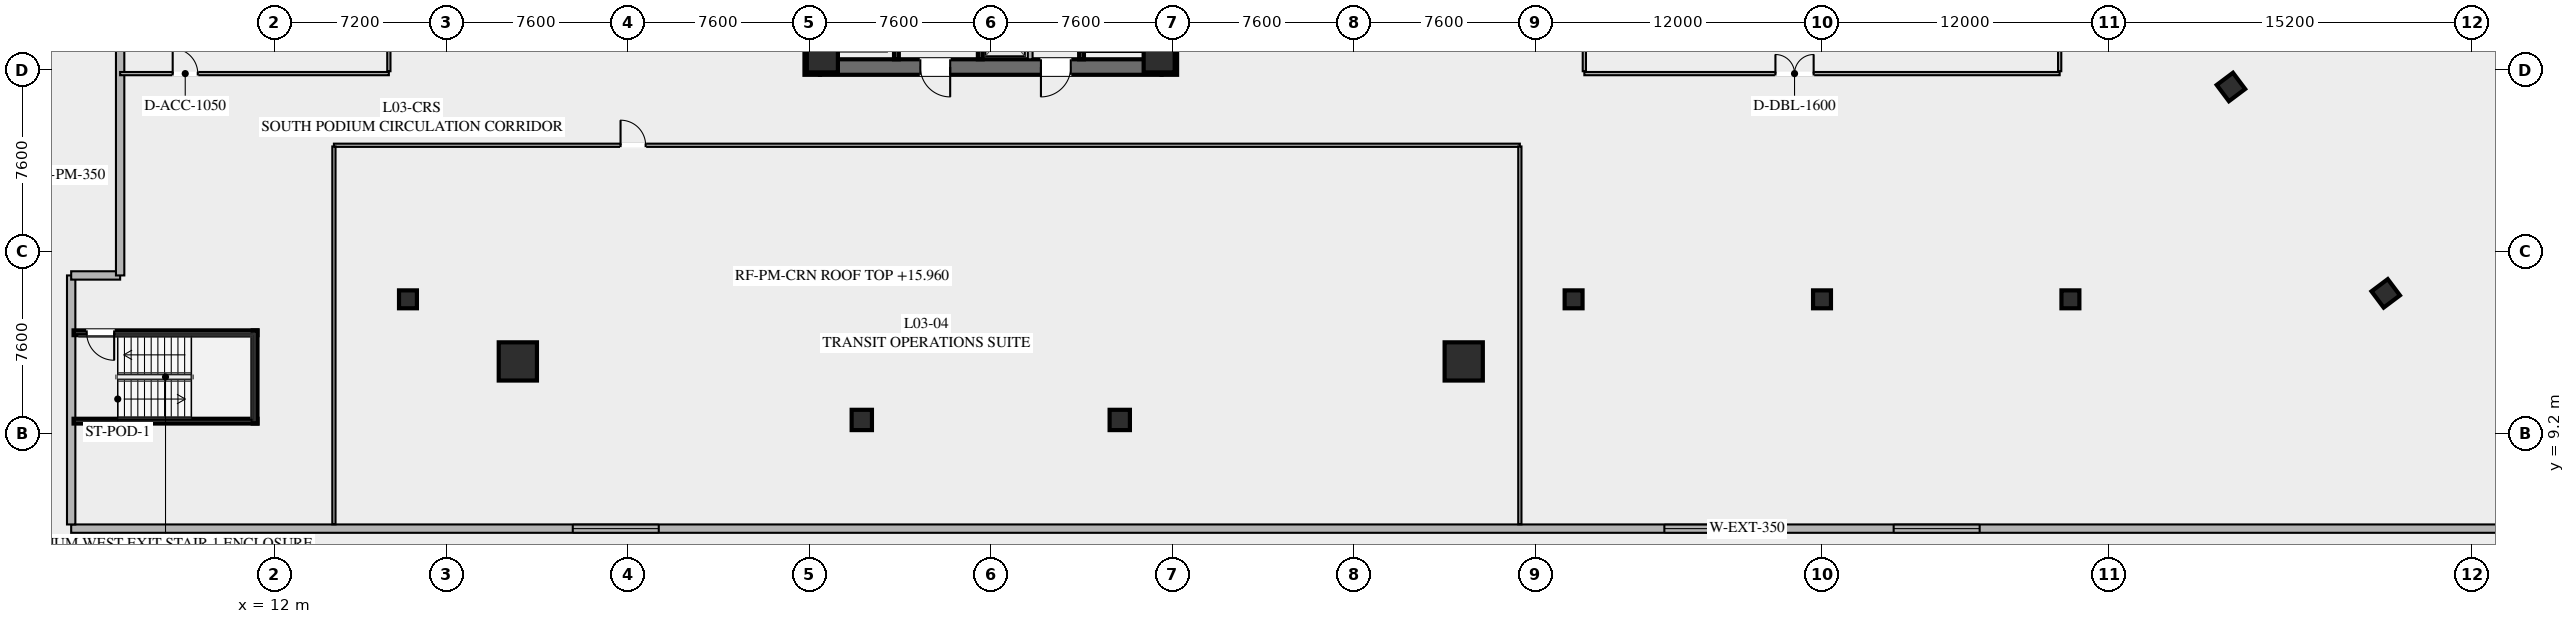
"""IFC4 building model, lengths in metres.
Left out: names, types, materials, properties, quantities, classifications, styles, units other than length and angle.
Written with IfcOpenShell. Run it as: python <this file> out.ifc"""

import sys

from ifc_helpers import new_model, si_unit, direction, frame, frame_2d, origin, origin_2d, place, context, subcontext, project, spatial, rectangle, hollow_rectangle, extrude, element, fill, save


model = new_model("IFC4")
c1 = context("Model", 3, precision=1e-05, world=origin(), true_north=direction((0.0, 1.0)))
c2 = subcontext(c1, "Body", "Model", "MODEL_VIEW")
j1 = project(units=[si_unit("LENGTHUNIT", "METRE"), si_unit("PLANEANGLEUNIT", "RADIAN")], contexts=[c1])
p1 = place(None, origin())
s1 = spatial("IfcSite", under=j1, at=p1, CompositionType="ELEMENT")
p2 = place(p1, origin())
s2 = spatial("IfcBuilding", under=s1, at=p2, CompositionType="ELEMENT")
p3 = place(p2, frame((0.0, 0.0, 15.6)))
s3 = spatial("IfcBuildingStorey", under=s2, at=p3, CompositionType="ELEMENT", Elevation=15.6)
for number, where, z_axis, x_axis in (
    (1, (34.525, 24.2, 0.0), (0.0, 0.0, 1.0), (0.0, 1.0, 0.0)),
    (2, (49.475, 39.8, 0.0), (0.0, 0.0, 1.0), (0.0, -1.0, 0.0)),
):
    element("IfcWall", number, at=place(p3, frame(where, z_axis=z_axis, x_axis=x_axis)), inside=s3, PredefinedType="SHEAR", context=c2, shape_type="SweptSolid", body=[
        extrude(rectangle(XDim=15.6, YDim=0.65, at=frame_2d((7.8, 0.0))), origin(), (0.0, 0.0, 1.0), 4.2),
    ])
p4 = place(p3, frame((49.15, 24.525, 0.0), z_axis=(0.0, 0.0, 1.0), x_axis=(-1.0, 0.0, 0.0)))
e3 = element("IfcWall", 3, at=p4, inside=s3, PredefinedType="SHEAR", context=c2, shape_type="SweptSolid", body=[
    extrude(rectangle(XDim=14.3, YDim=0.65, at=frame_2d((7.15, 0.0))), origin(), (0.0, 0.0, 1.0), 4.2),
])
p5 = place(p4, frame((8.85, 0.0, 0.0)))
e4 = element("IfcOpeningElement", 4, at=p5, cuts=e3, PredefinedType="OPENING", context=c2, shape_type="SweptSolid", body=[
    extrude(rectangle(XDim=1.25, YDim=2.25, at=frame_2d((0.625, 1.125))), frame((0.0, 0.335, 0.0), z_axis=(0.0, -1.0, 0.0), x_axis=(1.0, 0.0, 0.0)), (0.0, 0.0, 1.0), 0.67),
])
p6 = place(p4, frame((3.8, 0.0, 0.0)))
e5 = element("IfcOpeningElement", 5, at=p6, cuts=e3, PredefinedType="OPENING", context=c2, shape_type="SweptSolid", body=[
    extrude(rectangle(XDim=1.25, YDim=2.25, at=frame_2d((0.625, 1.125))), frame((0.0, 0.335, 0.0), z_axis=(0.0, -1.0, 0.0), x_axis=(1.0, 0.0, 0.0)), (0.0, 0.0, 1.0), 0.67),
])
for number, where, z_axis, x_axis in (
    (6, (34.95, 24.95, 0.0), (0.0, 0.0, 1.0), (1.0, 0.0, 0.0)),
    (7, (49.05, 24.95, 0.0), (0.0, 0.0, 1.0), (1.0, 0.0, 0.0)),
):
    element("IfcColumn", number, at=place(p3, frame(where, z_axis=z_axis, x_axis=x_axis)), inside=s3, PredefinedType="COLUMN", context=c2, shape_type="SweptSolid", body=[
        extrude(hollow_rectangle(XDim=1.3, YDim=1.3, WallThickness=0.05, at=origin_2d()), origin(), (0.0, 0.0, 1.0), 3.9),
    ])
for number, where, z_axis, x_axis in (
    (8, (22.2, 12.2, 0.0), (0.0, 0.0, 1.0), (1.0, 0.0, 0.0)),
    (9, (61.8, 12.2, 0.0), (0.0, 0.0, 1.0), (1.0, 0.0, 0.0)),
):
    element("IfcColumn", number, at=place(p3, frame(where, z_axis=z_axis, x_axis=x_axis)), inside=s3, PredefinedType="COLUMN", context=c2, shape_type="SweptSolid", body=[
        extrude(hollow_rectangle(XDim=1.6, YDim=1.6, WallThickness=0.06, at=origin_2d()), origin(), (0.0, 0.0, 1.0), 3.9),
    ])
for number, where, z_axis, x_axis in (
    (10, (36.6, 9.75, 0.0), (0.0, 0.0, 1.0), (1.0, 0.0, 0.0)),
    (11, (47.4, 9.75, 0.0), (0.0, 0.0, 1.0), (1.0, 0.0, 0.0)),
):
    element("IfcColumn", number, at=place(p3, frame(where, z_axis=z_axis, x_axis=x_axis)), inside=s3, PredefinedType="COLUMN", context=c2, shape_type="SweptSolid", body=[
        extrude(hollow_rectangle(XDim=0.85, YDim=0.85, WallThickness=0.035, at=origin_2d()), origin(), (0.0, 0.0, 1.0), 3.9),
    ])
p7 = place(p3, frame((112.476, 21.107, 0.0), z_axis=(0.0, 0.0, 1.0), x_axis=(-0.600005007985, 0.799996243986, 0.0)))
e12 = element("IfcWall", 12, at=p7, inside=s3, PredefinedType="SHEAR", context=c2, shape_type="SweptSolid", body=[
    extrude(rectangle(XDim=15.6, YDim=0.65, at=frame_2d((7.8, 0.0))), origin(), (0.0, 0.0, 1.0), 4.2),
])
for number, where, z_axis, x_axis in (
    (13, (93.92, 23.69, 0.0), (0.0, 0.0, 1.0), (0.8, 0.6, 0.0)),
    (14, (100.4, 15.05, 0.0), (0.0, 0.0, 1.0), (0.8, 0.6, 0.0)),
):
    element("IfcColumn", number, at=place(p3, frame(where, z_axis=z_axis, x_axis=x_axis)), inside=s3, PredefinedType="COLUMN", context=c2, shape_type="SweptSolid", body=[
        extrude(hollow_rectangle(XDim=0.85, YDim=0.85, WallThickness=0.035, at=origin_2d()), origin(), (0.0, 0.0, 1.0), 3.9),
    ])
for number, where, z_axis, x_axis in (
    (15, (17.6, 14.8, 0.0), (0.0, 0.0, 1.0), (1.0, 0.0, 0.0)),
    (16, (66.4, 14.8, 0.0), (0.0, 0.0, 1.0), (1.0, 0.0, 0.0)),
    (17, (76.8, 14.8, 0.0), (0.0, 0.0, 1.0), (1.0, 0.0, 0.0)),
    (18, (87.2, 14.8, 0.0), (0.0, 0.0, 1.0), (1.0, 0.0, 0.0)),
):
    element("IfcColumn", number, at=place(p3, frame(where, z_axis=z_axis, x_axis=x_axis)), inside=s3, PredefinedType="COLUMN", context=c2, shape_type="SweptSolid", body=[
        extrude(rectangle(XDim=0.75, YDim=0.75, at=origin_2d()), origin(), (0.0, 0.0, 1.0), 3.9),
    ])
p8 = place(p3, frame((143.825, 5.2, 0.0), z_axis=(0.0, 0.0, 1.0), x_axis=(-1.0, 0.0, 0.0)))
e19 = element("IfcWall", 19, at=p8, inside=s3, PredefinedType="SOLIDWALL", context=c2, shape_type="SweptSolid", body=[
    extrude(rectangle(XDim=140.325, YDim=0.35, at=frame_2d((70.163, 0.0))), origin(), (0.0, 0.0, 1.0), 3.9),
])
p9 = place(p8, frame((115.725, 0.0, 0.95)))
e20 = element("IfcOpeningElement", 20, at=p9, cuts=e19, PredefinedType="OPENING", context=c2, shape_type="SweptSolid", body=[
    extrude(rectangle(XDim=3.6, YDim=1.8, at=frame_2d((1.8, 0.9))), frame((0.0, 0.185, 0.0), z_axis=(0.0, -1.0, 0.0), x_axis=(1.0, 0.0, 0.0)), (0.0, 0.0, 1.0), 0.37),
])
p10 = place(p8, frame((70.025, 0.0, 0.95)))
e21 = element("IfcOpeningElement", 21, at=p10, cuts=e19, PredefinedType="OPENING", context=c2, shape_type="SweptSolid", body=[
    extrude(rectangle(XDim=3.6, YDim=1.8, at=frame_2d((1.8, 0.9))), frame((0.0, 0.185, 0.0), z_axis=(0.0, -1.0, 0.0), x_axis=(1.0, 0.0, 0.0)), (0.0, 0.0, 1.0), 0.37),
])
p11 = place(p8, frame((60.425, 0.0, 0.95)))
e22 = element("IfcOpeningElement", 22, at=p11, cuts=e19, PredefinedType="OPENING", context=c2, shape_type="SweptSolid", body=[
    extrude(rectangle(XDim=3.6, YDim=1.8, at=frame_2d((1.8, 0.9))), frame((0.0, 0.185, 0.0), z_axis=(0.0, -1.0, 0.0), x_axis=(1.0, 0.0, 0.0)), (0.0, 0.0, 1.0), 0.37),
])
p12 = place(p3, frame((3.5, 5.375, 0.0), z_axis=(0.0, 0.0, 1.0), x_axis=(0.0, 1.0, 0.0)))
e23 = element("IfcWall", 23, at=p12, inside=s3, PredefinedType="SOLIDWALL", context=c2, shape_type="SweptSolid", body=[
    extrude(rectangle(XDim=10.425, YDim=0.35, at=frame_2d((5.212, 0.0))), origin(), (0.0, 0.0, 1.0), 3.9),
])
p13 = place(p3, frame((3.5, 15.8, 0.0), z_axis=(0.0, 0.0, 1.0), x_axis=(1.0, 0.0, 0.0)))
e24 = element("IfcWall", 24, at=p13, inside=s3, PredefinedType="SOLIDWALL", context=c2, shape_type="SweptSolid", body=[
    extrude(rectangle(XDim=2.05, YDim=0.35, at=frame_2d((1.025, 0.0))), origin(), (0.0, 0.0, 1.0), 3.9),
])
p14 = place(p3, frame((5.55, 15.8, 0.0), z_axis=(0.0, 0.0, 1.0), x_axis=(0.0, 1.0, 0.0)))
e25 = element("IfcWall", 25, at=p14, inside=s3, PredefinedType="SOLIDWALL", context=c2, shape_type="SweptSolid", body=[
    extrude(rectangle(XDim=42.475, YDim=0.35, at=frame_2d((21.237, 0.0))), origin(), (0.0, 0.0, 1.0), 3.9),
])
p15 = place(p14, frame((15.7, 0.0, 0.0)))
e26 = element("IfcOpeningElement", 26, at=p15, cuts=e25, PredefinedType="OPENING", context=c2, shape_type="SweptSolid", body=[
    extrude(rectangle(XDim=1.65, YDim=2.2, at=frame_2d((0.825, 1.1))), frame((0.0, 0.185, 0.0), z_axis=(0.0, -1.0, 0.0), x_axis=(1.0, 0.0, 0.0)), (0.0, 0.0, 1.0), 0.37),
])
p16 = place(p3, frame((45.8, 32.8, 0.0), z_axis=(0.0, 0.0, 1.0), x_axis=(0.0, -1.0, 0.0)))
e27 = element("IfcWall", 27, at=p16, inside=s3, PredefinedType="SHEAR", context=c2, shape_type="SweptSolid", body=[
    extrude(rectangle(XDim=7.95, YDim=0.2, at=frame_2d((3.975, 0.0))), origin(), (0.0, 0.0, 1.0), 3.9),
])
p17 = place(p16, frame((0.45, 0.0, 0.0)))
e28 = element("IfcOpeningElement", 28, at=p17, cuts=e27, PredefinedType="OPENING", context=c2, shape_type="SweptSolid", body=[
    extrude(rectangle(XDim=1.15, YDim=2.2, at=frame_2d((0.575, 1.1))), frame((0.0, 0.11, 0.0), z_axis=(0.0, -1.0, 0.0), x_axis=(1.0, 0.0, 0.0)), (0.0, 0.0, 1.0), 0.22),
])
p18 = place(p3, frame((41.56, 24.85, 0.0), z_axis=(0.0, 0.0, 1.0), x_axis=(0.0, 1.0, 0.0)))
e29 = element("IfcWall", 29, at=p18, inside=s3, PredefinedType="SHEAR", context=c2, shape_type="SweptSolid", body=[
    extrude(rectangle(XDim=14.3, YDim=0.2, at=frame_2d((7.15, 0.0))), origin(), (0.0, 0.0, 1.0), 3.9),
])
p19 = place(p3, frame((38.05, 24.85, 0.0), z_axis=(0.0, 0.0, 1.0), x_axis=(0.0, 1.0, 0.0)))
e30 = element("IfcWall", 30, at=p19, inside=s3, PredefinedType="SHEAR", context=c2, shape_type="SweptSolid", body=[
    extrude(rectangle(XDim=6.35, YDim=0.2, at=frame_2d((3.175, 0.0))), origin(), (0.0, 0.0, 1.0), 3.9),
])
p20 = place(p19, frame((4.775, 0.0, 0.0)))
e31 = element("IfcOpeningElement", 31, at=p20, cuts=e30, PredefinedType="OPENING", context=c2, shape_type="SweptSolid", body=[
    extrude(rectangle(XDim=1.3, YDim=2.25, at=frame_2d((0.65, 1.125))), frame((0.0, 0.11, 0.0), z_axis=(0.0, -1.0, 0.0), x_axis=(1.0, 0.0, 0.0)), (0.0, 0.0, 1.0), 0.22),
])
p21 = place(p19, frame((2.775, 0.0, 0.0)))
e32 = element("IfcOpeningElement", 32, at=p21, cuts=e30, PredefinedType="OPENING", context=c2, shape_type="SweptSolid", body=[
    extrude(rectangle(XDim=1.3, YDim=2.25, at=frame_2d((0.65, 1.125))), frame((0.0, 0.11, 0.0), z_axis=(0.0, -1.0, 0.0), x_axis=(1.0, 0.0, 0.0)), (0.0, 0.0, 1.0), 0.22),
])
p22 = place(p19, frame((0.575, 0.0, 0.0)))
e33 = element("IfcOpeningElement", 33, at=p22, cuts=e30, PredefinedType="OPENING", context=c2, shape_type="SweptSolid", body=[
    extrude(rectangle(XDim=1.3, YDim=2.25, at=frame_2d((0.65, 1.125))), frame((0.0, 0.11, 0.0), z_axis=(0.0, -1.0, 0.0), x_axis=(1.0, 0.0, 0.0)), (0.0, 0.0, 1.0), 0.22),
])
p23 = place(p3, frame((43.65, 24.85, 0.0), z_axis=(0.0, 0.0, 1.0), x_axis=(0.0, 1.0, 0.0)))
e34 = element("IfcWall", 34, at=p23, inside=s3, PredefinedType="SOLIDWALL", context=c2, shape_type="SweptSolid", body=[
    extrude(rectangle(XDim=6.8, YDim=0.2, at=frame_2d((3.4, 0.0))), origin(), (0.0, 0.0, 1.0), 3.9),
])
p24 = place(p23, frame((0.625, 0.0, 0.0)))
e35 = element("IfcOpeningElement", 35, at=p24, cuts=e34, PredefinedType="OPENING", context=c2, shape_type="SweptSolid", body=[
    extrude(rectangle(XDim=1.1, YDim=2.2, at=frame_2d((0.55, 1.1))), frame((0.0, 0.11, 0.0), z_axis=(0.0, -1.0, 0.0), x_axis=(1.0, 0.0, 0.0)), (0.0, 0.0, 1.0), 0.22),
])
p25 = place(p23, frame((2.875, 0.0, 0.0)))
e36 = element("IfcOpeningElement", 36, at=p25, cuts=e34, PredefinedType="OPENING", context=c2, shape_type="SweptSolid", body=[
    extrude(rectangle(XDim=1.1, YDim=2.2, at=frame_2d((0.55, 1.1))), frame((0.0, 0.11, 0.0), z_axis=(0.0, -1.0, 0.0), x_axis=(1.0, 0.0, 0.0)), (0.0, 0.0, 1.0), 0.22),
])
p26 = place(p23, frame((5.125, 0.0, 0.0)))
e37 = element("IfcOpeningElement", 37, at=p26, cuts=e34, PredefinedType="OPENING", context=c2, shape_type="SweptSolid", body=[
    extrude(rectangle(XDim=1.1, YDim=2.2, at=frame_2d((0.55, 1.1))), frame((0.0, 0.11, 0.0), z_axis=(0.0, -1.0, 0.0), x_axis=(1.0, 0.0, 0.0)), (0.0, 0.0, 1.0), 0.22),
])
p27 = place(p3, frame((11.3, 13.4, 0.0), z_axis=(0.0, 0.0, 1.0), x_axis=(-1.0, 0.0, 0.0)))
e38 = element("IfcWall", 38, at=p27, inside=s3, PredefinedType="SHEAR", context=c2, shape_type="SweptSolid", body=[
    extrude(rectangle(XDim=7.7, YDim=0.2, at=frame_2d((3.85, 0.0))), origin(), (0.0, 0.0, 1.0), 3.9),
])
p28 = place(p27, frame((6.0, 0.0, 0.0)))
e39 = element("IfcOpeningElement", 39, at=p28, cuts=e38, PredefinedType="OPENING", context=c2, shape_type="SweptSolid", body=[
    extrude(rectangle(XDim=1.15, YDim=2.2, at=frame_2d((0.575, 1.1))), frame((0.0, 0.11, 0.0), z_axis=(0.0, -1.0, 0.0), x_axis=(1.0, 0.0, 0.0)), (0.0, 0.0, 1.0), 0.22),
])
p29 = place(p3, frame((3.6, 9.7, 0.0), z_axis=(0.0, 0.0, 1.0), x_axis=(1.0, 0.0, 0.0)))
e40 = element("IfcWall", 40, at=p29, inside=s3, PredefinedType="SHEAR", context=c2, shape_type="SweptSolid", body=[
    extrude(rectangle(XDim=7.7, YDim=0.2, at=frame_2d((3.85, 0.0))), origin(), (0.0, 0.0, 1.0), 3.9),
])
p30 = place(p3, frame((11.2, 9.6, 0.0), z_axis=(0.0, 0.0, 1.0), x_axis=(0.0, 1.0, 0.0)))
e41 = element("IfcWall", 41, at=p30, inside=s3, PredefinedType="SHEAR", context=c2, shape_type="SweptSolid", body=[
    extrude(rectangle(XDim=3.9, YDim=0.2, at=frame_2d((1.95, 0.0))), origin(), (0.0, 0.0, 1.0), 3.9),
])
p31 = place(p3, frame((5.55, 24.25, 0.0), z_axis=(0.0, 0.0, 1.0), x_axis=(1.0, 0.0, 0.0)))
e42 = element("IfcWall", 42, at=p31, inside=s3, PredefinedType="PARTITIONING", context=c2, shape_type="SweptSolid", body=[
    extrude(rectangle(XDim=11.25, YDim=0.135, at=frame_2d((5.625, 0.0))), origin(), (0.0, 0.0, 1.0), 2.943),
])
p32 = place(p31, frame((2.2, 0.0, 0.0)))
e43 = element("IfcOpeningElement", 43, at=p32, cuts=e42, PredefinedType="OPENING", context=c2, shape_type="SweptSolid", body=[
    extrude(rectangle(XDim=1.05, YDim=2.2, at=frame_2d((0.525, 1.1))), frame((0.0, 0.077, 0.0), z_axis=(0.0, -1.0, 0.0), x_axis=(1.0, 0.0, 0.0)), (0.0, 0.0, 1.0), 0.155),
])
p33 = place(p3, frame((16.8, 24.35, 0.0), z_axis=(0.0, 0.0, 1.0), x_axis=(0.0, 1.0, 0.0)))
e44 = element("IfcWall", 44, at=p33, inside=s3, PredefinedType="PARTITIONING", context=c2, shape_type="SweptSolid", body=[
    extrude(rectangle(XDim=15.4, YDim=0.135, at=frame_2d((7.7, 0.0))), origin(), (0.0, 0.0, 1.0), 2.943),
])
p34 = place(p3, frame((66.85, 24.25, 0.0), z_axis=(0.0, 0.0, 1.0), x_axis=(1.0, 0.0, 0.0)))
e45 = element("IfcWall", 45, at=p34, inside=s3, PredefinedType="PARTITIONING", context=c2, shape_type="SweptSolid", body=[
    extrude(rectangle(XDim=19.9, YDim=0.135, at=frame_2d((9.95, 0.0))), origin(), (0.0, 0.0, 1.0), 2.943),
])
p35 = place(p34, frame((8.0, 0.0, 0.0)))
e46 = element("IfcOpeningElement", 46, at=p35, cuts=e45, PredefinedType="OPENING", context=c2, shape_type="SweptSolid", body=[
    extrude(rectangle(XDim=1.6, YDim=2.25, at=frame_2d((0.8, 1.125))), frame((0.0, 0.077, 0.0), z_axis=(0.0, -1.0, 0.0), x_axis=(1.0, 0.0, 0.0)), (0.0, 0.0, 1.0), 0.155),
])
for number, where, z_axis, x_axis in (
    (47, (66.85, 24.35, 0.0), (0.0, 0.0, 1.0), (0.0, 1.0, 0.0)),
    (48, (86.75, 24.35, 0.0), (0.0, 0.0, 1.0), (0.0, 1.0, 0.0)),
):
    element("IfcWall", number, at=place(p3, frame(where, z_axis=z_axis, x_axis=x_axis)), inside=s3, PredefinedType="PARTITIONING", context=c2, shape_type="SweptSolid", body=[
        extrude(rectangle(XDim=15.3, YDim=0.135, at=frame_2d((7.65, 0.0))), origin(), (0.0, 0.0, 1.0), 2.943),
    ])
p36 = place(p3, frame((14.5, 21.25, 0.0), z_axis=(0.0, 0.0, 1.0), x_axis=(1.0, 0.0, 0.0)))
e49 = element("IfcWall", 49, at=p36, inside=s3, PredefinedType="PARTITIONING", context=c2, shape_type="SweptSolid", body=[
    extrude(rectangle(XDim=49.65, YDim=0.135, at=frame_2d((24.825, 0.0))), origin(), (0.0, 0.0, 1.0), 2.943),
])
p37 = place(p36, frame((12.0, 0.0, 0.0)))
e50 = element("IfcOpeningElement", 50, at=p37, cuts=e49, PredefinedType="OPENING", context=c2, shape_type="SweptSolid", body=[
    extrude(rectangle(XDim=1.05, YDim=2.2, at=frame_2d((0.525, 1.1))), frame((0.0, 0.077, 0.0), z_axis=(0.0, -1.0, 0.0), x_axis=(1.0, 0.0, 0.0)), (0.0, 0.0, 1.0), 0.155),
])
for number, where, z_axis, x_axis in (
    (51, (14.5, 5.38, 0.0), (0.0, 0.0, 1.0), (0.0, 1.0, 0.0)),
    (52, (64.15, 5.38, 0.0), (0.0, 0.0, 1.0), (0.0, 1.0, 0.0)),
):
    element("IfcWall", number, at=place(p3, frame(where, z_axis=z_axis, x_axis=x_axis)), inside=s3, PredefinedType="PARTITIONING", context=c2, shape_type="SweptSolid", body=[
        extrude(rectangle(XDim=15.82, YDim=0.135, at=frame_2d((7.91, 0.0))), origin(), (0.0, 0.0, 1.0), 2.943),
    ])
p38 = place(p9, origin())
e53 = element("IfcWindow", 53, at=p38, inside=s3, PartitioningType="SINGLE_PANEL", PredefinedType="WINDOW", context=c2, shape_type="SweptSolid", body=[
    extrude(rectangle(XDim=3.6, YDim=1.8, at=frame_2d((1.8, 0.9))), frame((0.0, 0.03, 0.0), z_axis=(0.0, -1.0, 0.0), x_axis=(1.0, 0.0, 0.0)), (0.0, 0.0, 1.0), 0.06),
])
fill(e20, e53)
p39 = place(p10, origin())
e54 = element("IfcWindow", 54, at=p39, inside=s3, PartitioningType="SINGLE_PANEL", PredefinedType="WINDOW", context=c2, shape_type="SweptSolid", body=[
    extrude(rectangle(XDim=3.6, YDim=1.8, at=frame_2d((1.8, 0.9))), frame((0.0, 0.03, 0.0), z_axis=(0.0, -1.0, 0.0), x_axis=(1.0, 0.0, 0.0)), (0.0, 0.0, 1.0), 0.06),
])
fill(e21, e54)
p40 = place(p11, origin())
e55 = element("IfcWindow", 55, at=p40, inside=s3, PartitioningType="SINGLE_PANEL", PredefinedType="WINDOW", context=c2, shape_type="SweptSolid", body=[
    extrude(rectangle(XDim=3.6, YDim=1.8, at=frame_2d((1.8, 0.9))), frame((0.0, 0.03, 0.0), z_axis=(0.0, -1.0, 0.0), x_axis=(1.0, 0.0, 0.0)), (0.0, 0.0, 1.0), 0.06),
])
fill(e22, e55)
p41 = place(p5, origin())
e56 = element("IfcDoor", 56, at=p41, inside=s3, OperationType="SINGLE_SWING_LEFT", PredefinedType="DOOR", context=c2, shape_type="SweptSolid", body=[
    extrude(rectangle(XDim=1.25, YDim=2.25, at=frame_2d((0.625, 1.125))), frame((0.0, 0.025, 0.0), z_axis=(0.0, -1.0, 0.0), x_axis=(1.0, 0.0, 0.0)), (0.0, 0.0, 1.0), 0.05),
])
fill(e4, e56)
p42 = place(p6, origin())
e57 = element("IfcDoor", 57, at=p42, inside=s3, OperationType="SINGLE_SWING_RIGHT", PredefinedType="DOOR", context=c2, shape_type="SweptSolid", body=[
    extrude(rectangle(XDim=1.25, YDim=2.25, at=frame_2d((0.625, 1.125))), frame((0.0, 0.025, 0.0), z_axis=(0.0, -1.0, 0.0), x_axis=(1.0, 0.0, 0.0)), (0.0, 0.0, 1.0), 0.05),
])
fill(e5, e57)
p43 = place(p28, origin())
e58 = element("IfcDoor", 58, at=p43, inside=s3, OperationType="SINGLE_SWING_LEFT", PredefinedType="DOOR", context=c2, shape_type="SweptSolid", body=[
    extrude(rectangle(XDim=1.15, YDim=2.2, at=frame_2d((0.575, 1.1))), frame((0.0, 0.025, 0.0), z_axis=(0.0, -1.0, 0.0), x_axis=(1.0, 0.0, 0.0)), (0.0, 0.0, 1.0), 0.05),
])
fill(e39, e58)
p44 = place(p32, origin())
e59 = element("IfcDoor", 59, at=p44, inside=s3, OperationType="SINGLE_SWING_LEFT", PredefinedType="DOOR", context=c2, shape_type="SweptSolid", body=[
    extrude(rectangle(XDim=1.05, YDim=2.2, at=frame_2d((0.525, 1.1))), frame((0.0, 0.025, 0.0), z_axis=(0.0, -1.0, 0.0), x_axis=(1.0, 0.0, 0.0)), (0.0, 0.0, 1.0), 0.05),
])
fill(e43, e59)
p45 = place(p35, origin())
e60 = element("IfcDoor", 60, at=p45, inside=s3, OperationType="DOUBLE_DOOR_SINGLE_SWING", PredefinedType="DOOR", context=c2, shape_type="SweptSolid", body=[
    extrude(rectangle(XDim=1.6, YDim=2.25, at=frame_2d((0.8, 1.125))), frame((0.0, 0.025, 0.0), z_axis=(0.0, -1.0, 0.0), x_axis=(1.0, 0.0, 0.0)), (0.0, 0.0, 1.0), 0.05),
])
fill(e46, e60)
p46 = place(p37, origin())
e61 = element("IfcDoor", 61, at=p46, inside=s3, OperationType="SINGLE_SWING_LEFT", PredefinedType="DOOR", context=c2, shape_type="SweptSolid", body=[
    extrude(rectangle(XDim=1.05, YDim=2.2, at=frame_2d((0.525, 1.1))), frame((0.0, 0.025, 0.0), z_axis=(0.0, -1.0, 0.0), x_axis=(1.0, 0.0, 0.0)), (0.0, 0.0, 1.0), 0.05),
])
fill(e50, e61)
save(model, sys.argv[1])
